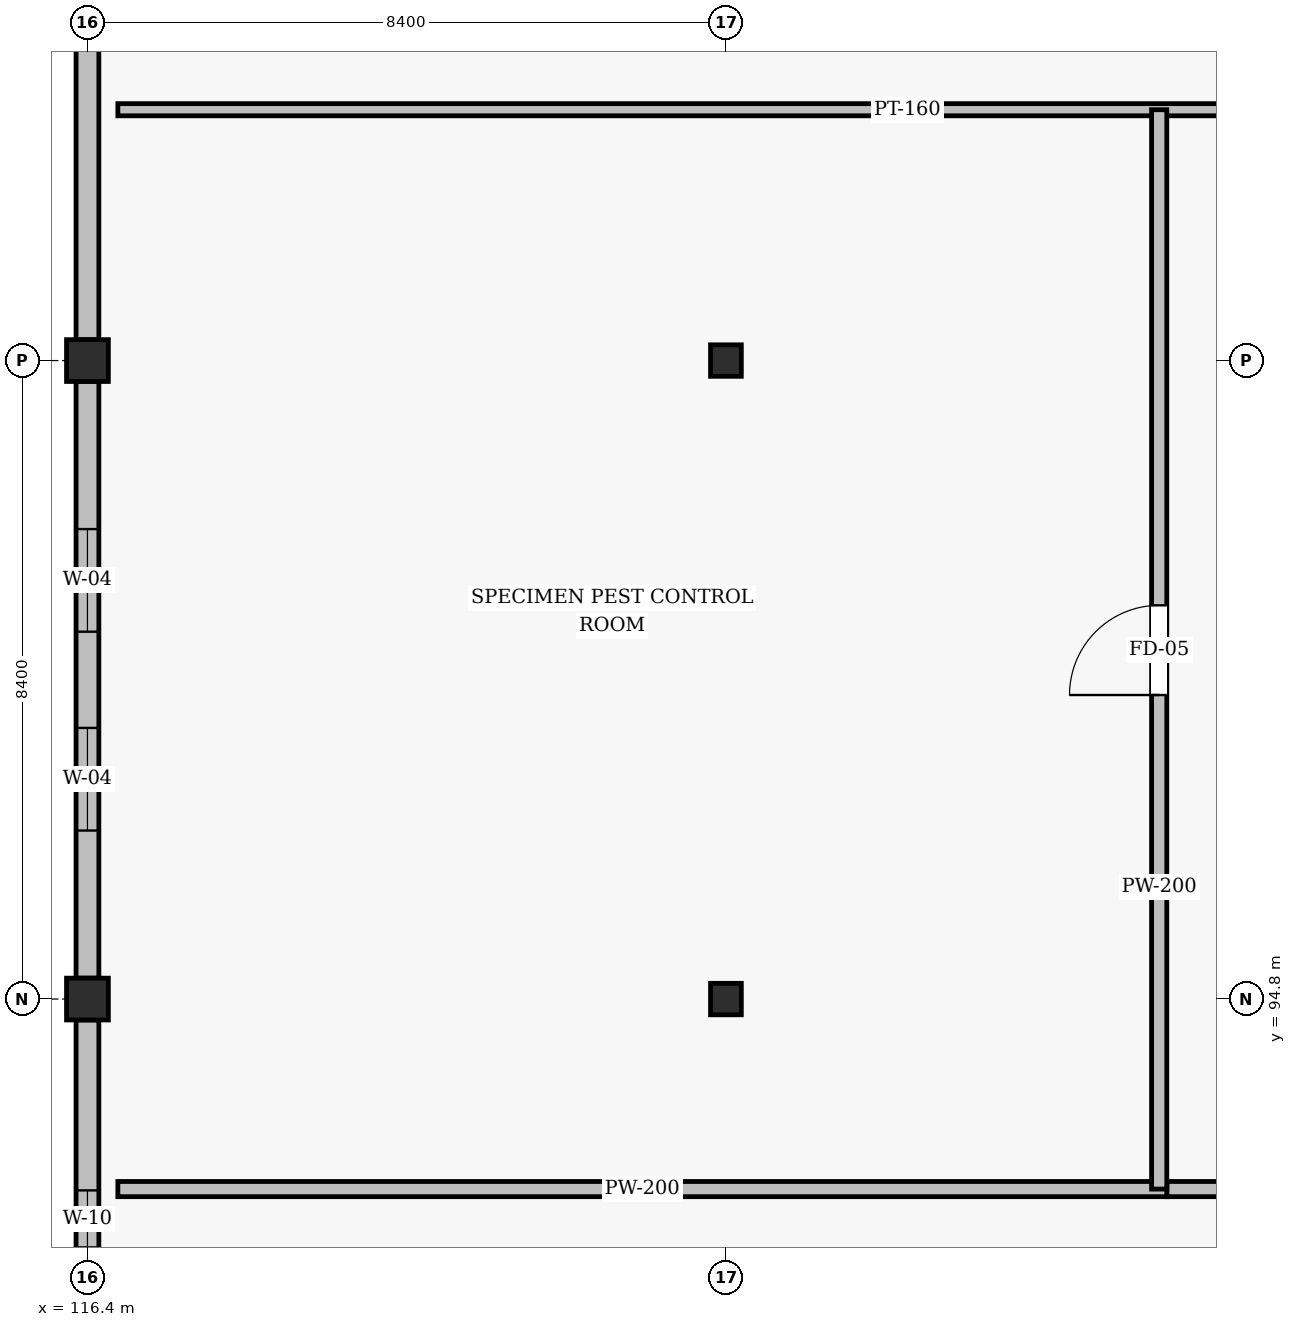
"""IFC4 building model, lengths in metres.
Left out: names, types, materials, properties, quantities, classifications, styles, units other than length and angle.
Written with IfcOpenShell. Run it as: python <this file> out.ifc"""

import sys

from ifc_helpers import new_model, si_unit, direction, frame, frame_2d, origin, origin_2d, place, context, subcontext, project, spatial, rectangle, hollow_rectangle, i_section, extrude, element, fill, save


model = new_model("IFC4")
c1 = context("Model", 3, precision=1e-05, world=origin(), true_north=direction((0.0, 1.0)))
c2 = subcontext(c1, "Body", "Model", "MODEL_VIEW")
j1 = project(units=[si_unit("LENGTHUNIT", "METRE"), si_unit("PLANEANGLEUNIT", "RADIAN")], contexts=[c1])
p1 = place(None, origin())
s1 = spatial("IfcSite", under=j1, at=p1, CompositionType="ELEMENT")
p2 = place(p1, origin())
s2 = spatial("IfcBuilding", under=s1, at=p2, CompositionType="ELEMENT")
p3 = place(p2, frame((0.0, 0.0, 17.1)))
s3 = spatial("IfcBuildingStorey", under=s2, at=p3, CompositionType="ELEMENT", Elevation=17.1)
for number, where, z_axis, x_axis in (
    (1, (116.4, 94.8, 0.0), (0.0, 0.0, 1.0), (1.0, 0.0, 0.0)),
    (2, (116.4, 103.2, 0.0), (0.0, 0.0, 1.0), (1.0, 0.0, 0.0)),
):
    element("IfcColumn", number, at=place(p3, frame(where, z_axis=z_axis, x_axis=x_axis)), inside=s3, PredefinedType="COLUMN", context=c2, shape_type="SweptSolid", body=[
        extrude(hollow_rectangle(XDim=0.55, YDim=0.55, WallThickness=0.022, InnerFilletRadius=0.022, OuterFilletRadius=0.044, at=origin_2d()), origin(), (0.0, 0.0, 1.0), 3.876),
    ])
for number, where, z_axis, x_axis in (
    (3, (124.8, 94.8, 0.0), (0.0, 0.0, 1.0), (1.0, 0.0, 0.0)),
    (4, (124.8, 103.2, 0.0), (0.0, 0.0, 1.0), (1.0, 0.0, 0.0)),
):
    element("IfcColumn", number, at=place(p3, frame(where, z_axis=z_axis, x_axis=x_axis)), inside=s3, PredefinedType="COLUMN", context=c2, shape_type="SweptSolid", body=[
        extrude(i_section(OverallWidth=0.405, OverallDepth=0.414, WebThickness=0.018, FlangeThickness=0.028, FilletRadius=0.022, at=origin_2d()), origin(), (0.0, 0.0, 1.0), 3.9),
    ])
p4 = place(p3, frame((116.4, 114.925, 0.0), z_axis=(0.0, 0.0, 1.0), x_axis=(0.0, -1.0, 0.0)))
e5 = element("IfcWall", 5, at=p4, inside=s3, PredefinedType="SOLIDWALL", context=c2, shape_type="SweptSolid", body=[
    extrude(rectangle(XDim=11.45, YDim=0.3, at=frame_2d((5.725, 0.0))), origin(), (0.0, 0.0, 1.0), 2.843),
])
p5 = place(p3, frame((116.4, 102.925, 0.0), z_axis=(0.0, 0.0, 1.0), x_axis=(0.0, -1.0, 0.0)))
e6 = element("IfcWall", 6, at=p5, inside=s3, PredefinedType="SOLIDWALL", context=c2, shape_type="SweptSolid", body=[
    extrude(rectangle(XDim=7.85, YDim=0.3, at=frame_2d((3.925, 0.0))), origin(), (0.0, 0.0, 1.0), 3.6),
])
p6 = place(p5, frame((1.942, 0.0, 0.85)))
e7 = element("IfcOpeningElement", 7, at=p6, cuts=e6, PredefinedType="OPENING", context=c2, shape_type="SweptSolid", body=[
    extrude(rectangle(XDim=1.35, YDim=2.1, at=frame_2d((0.675, 1.05))), frame((0.0, 0.16, 0.0), z_axis=(0.0, -1.0, 0.0), x_axis=(1.0, 0.0, 0.0)), (0.0, 0.0, 1.0), 0.32),
])
p7 = place(p5, frame((4.558, 0.0, 0.85)))
e8 = element("IfcOpeningElement", 8, at=p7, cuts=e6, PredefinedType="OPENING", context=c2, shape_type="SweptSolid", body=[
    extrude(rectangle(XDim=1.35, YDim=2.1, at=frame_2d((0.675, 1.05))), frame((0.0, 0.16, 0.0), z_axis=(0.0, -1.0, 0.0), x_axis=(1.0, 0.0, 0.0)), (0.0, 0.0, 1.0), 0.32),
])
p8 = place(p3, frame((116.4, 94.525, 0.0), z_axis=(0.0, 0.0, 1.0), x_axis=(0.0, -1.0, 0.0)))
e9 = element("IfcWall", 9, at=p8, inside=s3, PredefinedType="SOLIDWALL", context=c2, shape_type="SweptSolid", body=[
    extrude(rectangle(XDim=7.85, YDim=0.3, at=frame_2d((3.925, 0.0))), origin(), (0.0, 0.0, 1.0), 3.6),
])
p9 = place(p8, frame((2.242, 0.0, 1.05)))
e10 = element("IfcOpeningElement", 10, at=p9, cuts=e9, PredefinedType="OPENING", context=c2, shape_type="SweptSolid", body=[
    extrude(rectangle(XDim=0.75, YDim=1.6, at=frame_2d((0.375, 0.8))), frame((0.0, 0.16, 0.0), z_axis=(0.0, -1.0, 0.0), x_axis=(1.0, 0.0, 0.0)), (0.0, 0.0, 1.0), 0.32),
])
p10 = place(p8, frame((4.858, 0.0, 1.05)))
e11 = element("IfcOpeningElement", 11, at=p10, cuts=e9, PredefinedType="OPENING", context=c2, shape_type="SweptSolid", body=[
    extrude(rectangle(XDim=0.75, YDim=1.6, at=frame_2d((0.375, 0.8))), frame((0.0, 0.16, 0.0), z_axis=(0.0, -1.0, 0.0), x_axis=(1.0, 0.0, 0.0)), (0.0, 0.0, 1.0), 0.32),
])
p11 = place(p3, frame((130.6, 92.3, 0.0), z_axis=(0.0, 0.0, 1.0), x_axis=(1.0, 0.0, 0.0)))
e12 = element("IfcWall", 12, at=p11, inside=s3, PredefinedType="SOLIDWALL", context=c2, shape_type="SweptSolid", body=[
    extrude(rectangle(XDim=15.5, YDim=0.2, at=frame_2d((7.75, 0.0))), origin(), (0.0, 0.0, 1.0), 3.1),
])
p12 = place(p11, frame((7.05, 0.0, 0.0)))
e13 = element("IfcOpeningElement", 13, at=p12, cuts=e12, PredefinedType="OPENING", context=c2, shape_type="SweptSolid", body=[
    extrude(rectangle(XDim=1.42, YDim=2.18, at=frame_2d((0.71, 1.09))), frame((0.0, 0.11, 0.0), z_axis=(0.0, -1.0, 0.0), x_axis=(1.0, 0.0, 0.0)), (0.0, 0.0, 1.0), 0.22),
])
p13 = place(p3, frame((116.8, 92.3, 0.0), z_axis=(0.0, 0.0, 1.0), x_axis=(1.0, 0.0, 0.0)))
e14 = element("IfcWall", 14, at=p13, inside=s3, PredefinedType="SOLIDWALL", context=c2, shape_type="SweptSolid", body=[
    extrude(rectangle(XDim=13.8, YDim=0.2, at=frame_2d((6.9, 0.0))), origin(), (0.0, 0.0, 1.0), 3.1),
])
p14 = place(p3, frame((116.8, 106.5, 0.0), z_axis=(0.0, 0.0, 1.0), x_axis=(1.0, 0.0, 0.0)))
e15 = element("IfcWall", 15, at=p14, inside=s3, PredefinedType="PARTITIONING", context=c2, shape_type="SweptSolid", body=[
    extrude(rectangle(XDim=37.1, YDim=0.16, at=frame_2d((18.55, 0.0))), origin(), (0.0, 0.0, 1.0), 2.85),
])
p15 = place(p14, frame((17.95, 0.0, 0.0)))
e16 = element("IfcOpeningElement", 16, at=p15, cuts=e15, PredefinedType="OPENING", context=c2, shape_type="SweptSolid", body=[
    extrude(rectangle(XDim=1.25, YDim=2.12, at=frame_2d((0.625, 1.06))), frame((0.0, 0.09, 0.0), z_axis=(0.0, -1.0, 0.0), x_axis=(1.0, 0.0, 0.0)), (0.0, 0.0, 1.0), 0.18),
])
p16 = place(p3, frame((130.5, 92.3, 0.0), z_axis=(0.0, 0.0, 1.0), x_axis=(0.0, 1.0, 0.0)))
e17 = element("IfcWall", 17, at=p16, inside=s3, PredefinedType="SOLIDWALL", context=c2, shape_type="SweptSolid", body=[
    extrude(rectangle(XDim=14.2, YDim=0.2, at=frame_2d((7.1, 0.0))), origin(), (0.0, 0.0, 1.0), 3.1),
])
p17 = place(p16, frame((6.5, 0.0, 0.0)))
e18 = element("IfcOpeningElement", 18, at=p17, cuts=e17, PredefinedType="OPENING", context=c2, shape_type="SweptSolid", body=[
    extrude(rectangle(XDim=1.18, YDim=2.15, at=frame_2d((0.59, 1.075))), frame((0.0, 0.11, 0.0), z_axis=(0.0, -1.0, 0.0), x_axis=(1.0, 0.0, 0.0)), (0.0, 0.0, 1.0), 0.22),
])
p18 = place(p6, origin())
e19 = element("IfcWindow", 19, at=p18, inside=s3, PartitioningType="SINGLE_PANEL", PredefinedType="WINDOW", context=c2, shape_type="SweptSolid", body=[
    extrude(rectangle(XDim=1.35, YDim=2.1, at=frame_2d((0.675, 1.05))), frame((0.0, 0.03, 0.0), z_axis=(0.0, -1.0, 0.0), x_axis=(1.0, 0.0, 0.0)), (0.0, 0.0, 1.0), 0.06),
])
fill(e7, e19)
p19 = place(p7, origin())
e20 = element("IfcWindow", 20, at=p19, inside=s3, PartitioningType="SINGLE_PANEL", PredefinedType="WINDOW", context=c2, shape_type="SweptSolid", body=[
    extrude(rectangle(XDim=1.35, YDim=2.1, at=frame_2d((0.675, 1.05))), frame((0.0, 0.03, 0.0), z_axis=(0.0, -1.0, 0.0), x_axis=(1.0, 0.0, 0.0)), (0.0, 0.0, 1.0), 0.06),
])
fill(e8, e20)
p20 = place(p9, origin())
e21 = element("IfcWindow", 21, at=p20, inside=s3, PartitioningType="SINGLE_PANEL", PredefinedType="WINDOW", context=c2, shape_type="SweptSolid", body=[
    extrude(rectangle(XDim=0.75, YDim=1.6, at=frame_2d((0.375, 0.8))), frame((0.0, 0.03, 0.0), z_axis=(0.0, -1.0, 0.0), x_axis=(1.0, 0.0, 0.0)), (0.0, 0.0, 1.0), 0.06),
])
fill(e10, e21)
p21 = place(p17, origin())
e22 = element("IfcDoor", 22, at=p21, inside=s3, OperationType="SINGLE_SWING_LEFT", PredefinedType="DOOR", context=c2, shape_type="SweptSolid", body=[
    extrude(rectangle(XDim=1.18, YDim=2.15, at=frame_2d((0.59, 1.075))), frame((0.0, 0.025, 0.0), z_axis=(0.0, -1.0, 0.0), x_axis=(1.0, 0.0, 0.0)), (0.0, 0.0, 1.0), 0.05),
])
fill(e18, e22)
save(model, sys.argv[1])
